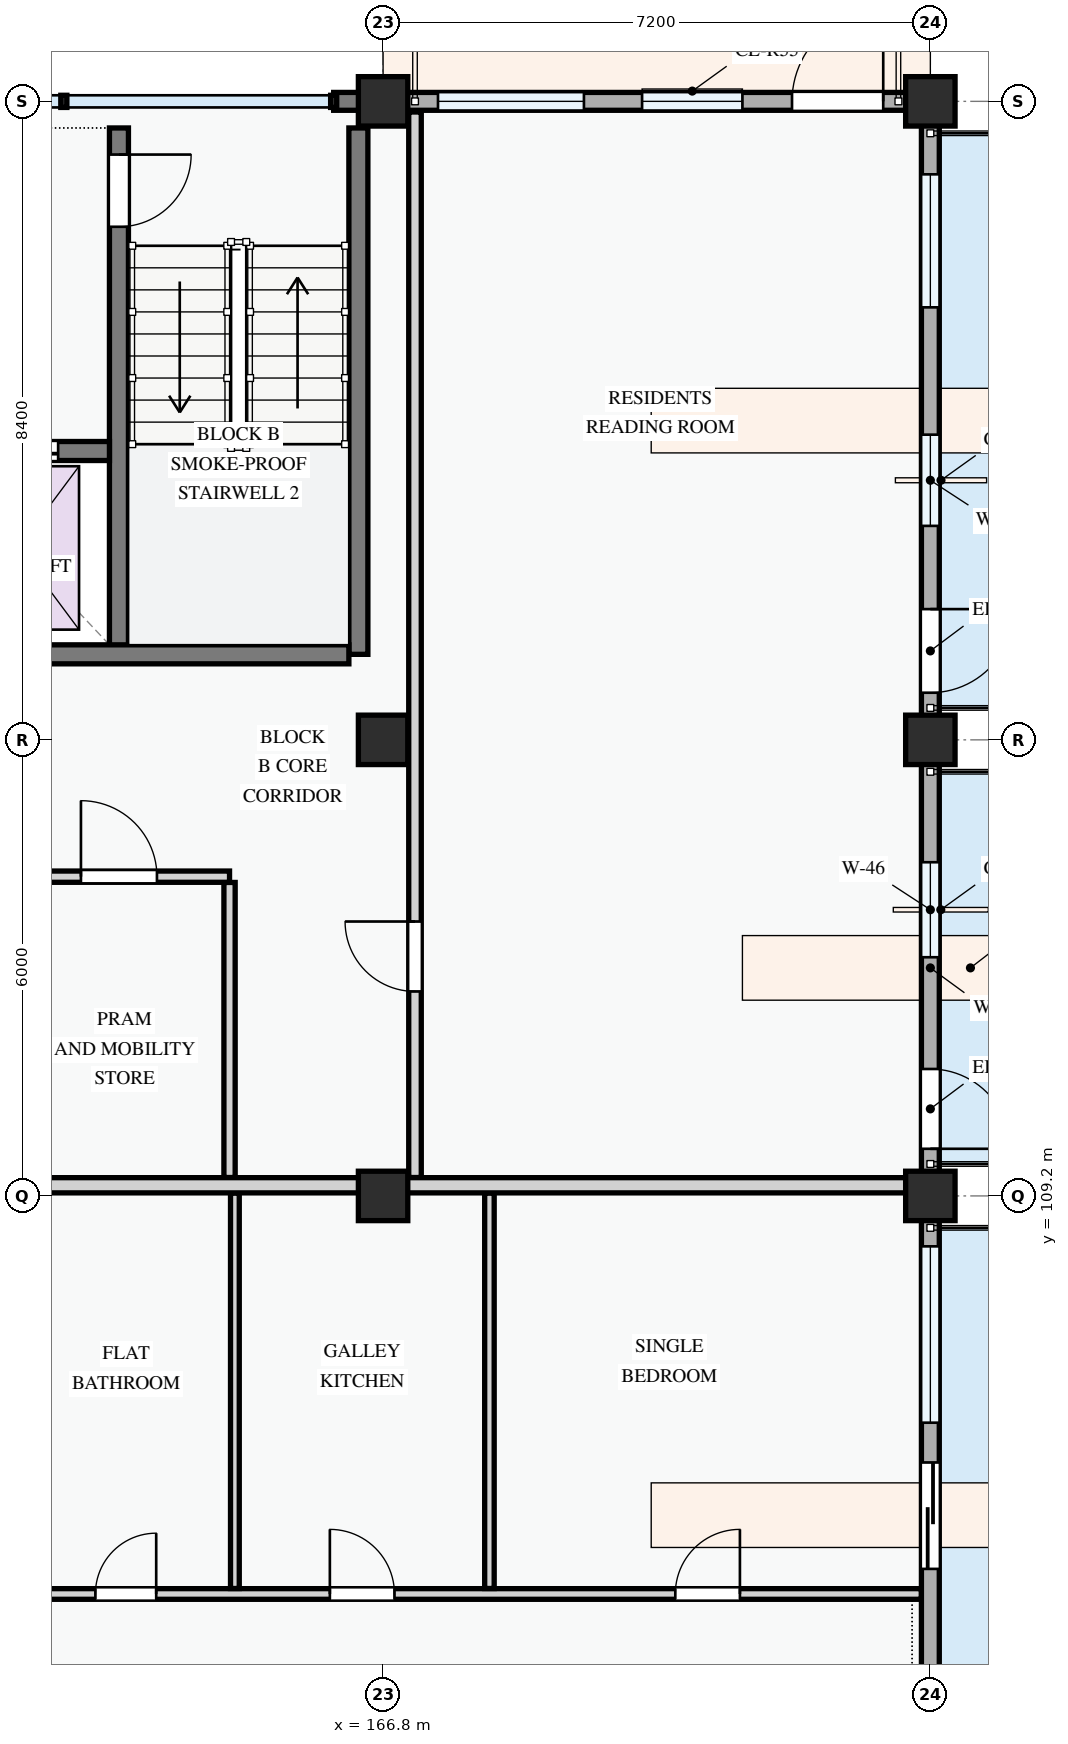
"""IFC4 building model, lengths in metres.
Left out: names, types, materials, properties, quantities, classifications, styles, units other than length and angle.
Written with IfcOpenShell. Run it as: python <this file> out.ifc"""

import sys

from ifc_helpers import new_model, si_unit, direction, frame, frame_2d, origin, origin_2d, place, context, subcontext, project, spatial, rectangle, extrude, element, fill, save


model = new_model("IFC4")
c1 = context("Model", 3, precision=1e-05, world=origin(), true_north=direction((0.0, 1.0)))
c2 = subcontext(c1, "Body", "Model", "MODEL_VIEW")
j1 = project(units=[si_unit("LENGTHUNIT", "METRE"), si_unit("PLANEANGLEUNIT", "RADIAN")], contexts=[c1])
p1 = place(None, origin())
s1 = spatial("IfcSite", under=j1, at=p1, CompositionType="ELEMENT")
p2 = place(p1, origin())
s2 = spatial("IfcBuilding", under=s1, at=p2, CompositionType="ELEMENT")
p3 = place(p2, frame((0.0, 0.0, 8.1)))
s3 = spatial("IfcBuildingStorey", under=s2, at=p3, CompositionType="ELEMENT", Elevation=8.1)
for number, where, z_axis, x_axis in (
    (1, (166.8, 109.2, 0.0), (0.0, 0.0, 1.0), (1.0, 0.0, 0.0)),
    (2, (166.8, 115.2, 0.0), (0.0, 0.0, 1.0), (1.0, 0.0, 0.0)),
    (3, (166.8, 123.6, 0.0), (0.0, 0.0, 1.0), (1.0, 0.0, 0.0)),
    (4, (174.0, 109.2, 0.0), (0.0, 0.0, 1.0), (1.0, 0.0, 0.0)),
    (5, (174.0, 115.2, 0.0), (0.0, 0.0, 1.0), (1.0, 0.0, 0.0)),
    (6, (174.0, 123.6, 0.0), (0.0, 0.0, 1.0), (1.0, 0.0, 0.0)),
):
    element("IfcColumn", number, at=place(p3, frame(where, z_axis=z_axis, x_axis=x_axis)), inside=s3, PredefinedType="COLUMN", context=c2, shape_type="SweptSolid", body=[
        extrude(rectangle(XDim=0.65, YDim=0.65, at=origin_2d()), origin(), (0.0, 0.0, 1.0), 3.3),
    ])
p4 = place(p3, frame((174.0, 109.2, 0.0), z_axis=(0.0, 0.0, 1.0), x_axis=(0.0, 1.0, 0.0)))
e7 = element("IfcWall", 7, at=p4, inside=s3, PredefinedType="STANDARD", context=c2, shape_type="SweptSolid", body=[
    extrude(rectangle(XDim=6.0, YDim=0.235, at=frame_2d((3.0, 0.0))), origin(), (0.0, 0.0, 1.0), 2.575),
])
p5 = place(p4, frame((0.62, 0.0, 0.0)))
e8 = element("IfcOpeningElement", 8, at=p5, cuts=e7, PredefinedType="OPENING", context=c2, shape_type="SweptSolid", body=[
    extrude(rectangle(XDim=1.05, YDim=2.15, at=frame_2d((0.525, 1.075))), frame((0.0, 0.127, 0.0), z_axis=(0.0, -1.0, 0.0), x_axis=(1.0, 0.0, 0.0)), (0.0, 0.0, 1.0), 0.255),
])
p6 = place(p4, frame((3.14, 0.0, 0.78)))
e9 = element("IfcOpeningElement", 9, at=p6, cuts=e7, PredefinedType="OPENING", context=c2, shape_type="SweptSolid", body=[
    extrude(rectangle(XDim=1.25, YDim=1.3, at=frame_2d((0.625, 0.65))), frame((0.0, 0.127, 0.0), z_axis=(0.0, -1.0, 0.0), x_axis=(1.0, 0.0, 0.0)), (0.0, 0.0, 1.0), 0.255),
])
p7 = place(p3, frame((174.0, 115.2, 0.0), z_axis=(0.0, 0.0, 1.0), x_axis=(0.0, 1.0, 0.0)))
e10 = element("IfcWall", 10, at=p7, inside=s3, PredefinedType="STANDARD", context=c2, shape_type="SweptSolid", body=[
    extrude(rectangle(XDim=8.4, YDim=0.235, at=frame_2d((4.2, 0.0))), origin(), (0.0, 0.0, 1.0), 2.425),
])
p8 = place(p7, frame((0.62, 0.0, 0.0)))
e11 = element("IfcOpeningElement", 11, at=p8, cuts=e10, PredefinedType="OPENING", context=c2, shape_type="SweptSolid", body=[
    extrude(rectangle(XDim=1.1, YDim=2.15, at=frame_2d((0.55, 1.075))), frame((0.0, 0.127, 0.0), z_axis=(0.0, -1.0, 0.0), x_axis=(1.0, 0.0, 0.0)), (0.0, 0.0, 1.0), 0.255),
])
p9 = place(p7, frame((2.815, 0.0, 0.78)))
e12 = element("IfcOpeningElement", 12, at=p9, cuts=e10, PredefinedType="OPENING", context=c2, shape_type="SweptSolid", body=[
    extrude(rectangle(XDim=1.2, YDim=1.35, at=frame_2d((0.6, 0.675))), frame((0.0, 0.127, 0.0), z_axis=(0.0, -1.0, 0.0), x_axis=(1.0, 0.0, 0.0)), (0.0, 0.0, 1.0), 0.255),
])
p10 = place(p7, frame((5.69, 0.0, 0.78)))
e13 = element("IfcOpeningElement", 13, at=p10, cuts=e10, PredefinedType="OPENING", context=c2, shape_type="SweptSolid", body=[
    extrude(rectangle(XDim=1.75, YDim=1.45, at=frame_2d((0.875, 0.725))), frame((0.0, 0.127, 0.0), z_axis=(0.0, -1.0, 0.0), x_axis=(1.0, 0.0, 0.0)), (0.0, 0.0, 1.0), 0.255),
])
p11 = place(p3, frame((174.0, 123.6, 0.0), z_axis=(0.0, 0.0, 1.0), x_axis=(-1.0, 0.0, 0.0)))
e14 = element("IfcWall", 14, at=p11, inside=s3, PredefinedType="STANDARD", context=c2, shape_type="SweptSolid", body=[
    extrude(rectangle(XDim=7.2, YDim=0.235, at=frame_2d((3.6, 0.0))), origin(), (0.0, 0.0, 1.0), 2.345),
])
p12 = place(p11, frame((0.62, 0.0, 0.0)))
e15 = element("IfcOpeningElement", 15, at=p12, cuts=e14, PredefinedType="OPENING", context=c2, shape_type="SweptSolid", body=[
    extrude(rectangle(XDim=1.2, YDim=2.15, at=frame_2d((0.6, 1.075))), frame((0.0, 0.127, 0.0), z_axis=(0.0, -1.0, 0.0), x_axis=(1.0, 0.0, 0.0)), (0.0, 0.0, 1.0), 0.255),
])
p13 = place(p11, frame((2.472, 0.0, 0.78)))
e16 = element("IfcOpeningElement", 16, at=p13, cuts=e14, PredefinedType="OPENING", context=c2, shape_type="SweptSolid", body=[
    extrude(rectangle(XDim=1.32, YDim=1.35, at=frame_2d((0.66, 0.675))), frame((0.0, 0.127, 0.0), z_axis=(0.0, -1.0, 0.0), x_axis=(1.0, 0.0, 0.0)), (0.0, 0.0, 1.0), 0.255),
])
p14 = place(p11, frame((4.558, 0.0, 0.78)))
e17 = element("IfcOpeningElement", 17, at=p14, cuts=e14, PredefinedType="OPENING", context=c2, shape_type="SweptSolid", body=[
    extrude(rectangle(XDim=1.92, YDim=1.44, at=frame_2d((0.96, 0.72))), frame((0.0, 0.127, 0.0), z_axis=(0.0, -1.0, 0.0), x_axis=(1.0, 0.0, 0.0)), (0.0, 0.0, 1.0), 0.255),
])
p15 = place(p3, frame((166.8, 123.6, 0.0), z_axis=(0.0, 0.0, 1.0), x_axis=(-1.0, 0.0, 0.0)))
e18 = element("IfcWall", 18, at=p15, inside=s3, PredefinedType="STANDARD", context=c2, shape_type="SweptSolid", body=[
    extrude(rectangle(XDim=0.65, YDim=0.235, at=frame_2d((0.325, 0.0))), origin(), (0.0, 0.0, 1.0), 3.04),
])
p16 = place(p3, frame((174.0, 100.8, 0.0), z_axis=(0.0, 0.0, 1.0), x_axis=(0.0, 1.0, 0.0)))
e19 = element("IfcWall", 19, at=p16, inside=s3, PredefinedType="STANDARD", context=c2, shape_type="SweptSolid", body=[
    extrude(rectangle(XDim=8.4, YDim=0.235, at=frame_2d((4.2, 0.0))), origin(), (0.0, 0.0, 1.0), 2.425),
])
p17 = place(p16, frame((3.493, 0.0, 0.0)))
e20 = element("IfcOpeningElement", 20, at=p17, cuts=e19, PredefinedType="OPENING", context=c2, shape_type="SweptSolid", body=[
    extrude(rectangle(XDim=1.4, YDim=2.2, at=frame_2d((0.7, 1.1))), frame((0.0, 0.127, 0.0), z_axis=(0.0, -1.0, 0.0), x_axis=(1.0, 0.0, 0.0)), (0.0, 0.0, 1.0), 0.255),
])
p18 = place(p16, frame((1.177, 0.0, 0.78)))
e21 = element("IfcOpeningElement", 21, at=p18, cuts=e19, PredefinedType="OPENING", context=c2, shape_type="SweptSolid", body=[
    extrude(rectangle(XDim=1.0, YDim=1.25, at=frame_2d((0.5, 0.625))), frame((0.0, 0.127, 0.0), z_axis=(0.0, -1.0, 0.0), x_axis=(1.0, 0.0, 0.0)), (0.0, 0.0, 1.0), 0.255),
])
p19 = place(p16, frame((5.417, 0.0, 0.78)))
e22 = element("IfcOpeningElement", 22, at=p19, cuts=e19, PredefinedType="OPENING", context=c2, shape_type="SweptSolid", body=[
    extrude(rectangle(XDim=2.32, YDim=1.5, at=frame_2d((1.16, 0.75))), frame((0.0, 0.127, 0.0), z_axis=(0.0, -1.0, 0.0), x_axis=(1.0, 0.0, 0.0)), (0.0, 0.0, 1.0), 0.255),
])
p20 = place(p3, frame((166.475, 123.25, 0.0), z_axis=(0.0, 0.0, 1.0), x_axis=(0.0, -1.0, 0.0)))
e23 = element("IfcWall", 23, at=p20, inside=s3, PredefinedType="SHEAR", context=c2, shape_type="SweptSolid", body=[
    extrude(rectangle(XDim=6.925, YDim=0.25, at=frame_2d((3.462, 0.0))), origin(), (0.0, 0.0, 1.0), 3.0),
])
p21 = place(p3, frame((163.325, 123.25, 0.0), z_axis=(0.0, 0.0, 1.0), x_axis=(0.0, -1.0, 0.0)))
e24 = element("IfcWall", 24, at=p21, inside=s3, PredefinedType="SHEAR", context=c2, shape_type="SweptSolid", body=[
    extrude(rectangle(XDim=6.925, YDim=0.25, at=frame_2d((3.462, 0.0))), origin(), (0.0, 0.0, 1.0), 3.0),
])
p22 = place(p21, frame((0.35, 0.0, 0.0)))
e25 = element("IfcOpeningElement", 25, at=p22, cuts=e24, PredefinedType="OPENING", context=c2, shape_type="SweptSolid", body=[
    extrude(rectangle(XDim=0.95, YDim=2.1, at=frame_2d((0.475, 1.05))), frame((0.0, 0.135, 0.0), z_axis=(0.0, -1.0, 0.0), x_axis=(1.0, 0.0, 0.0)), (0.0, 0.0, 1.0), 0.27),
])
p23 = place(p3, frame((160.775, 119.0, 0.0), z_axis=(0.0, 0.0, 1.0), x_axis=(1.0, 0.0, 0.0)))
e26 = element("IfcWall", 26, at=p23, inside=s3, PredefinedType="SHEAR", context=c2, shape_type="SweptSolid", body=[
    extrude(rectangle(XDim=2.425, YDim=0.25, at=frame_2d((1.212, 0.0))), origin(), (0.0, 0.0, 1.0), 3.0),
])
p24 = place(p23, frame((0.65, 0.0, 0.0)))
e27 = element("IfcOpeningElement", 27, at=p24, cuts=e26, PredefinedType="OPENING", context=c2, shape_type="SweptSolid", body=[
    extrude(rectangle(XDim=1.1, YDim=2.15, at=frame_2d((0.55, 1.075))), frame((0.0, 0.135, 0.0), z_axis=(0.0, -1.0, 0.0), x_axis=(1.0, 0.0, 0.0)), (0.0, 0.0, 1.0), 0.27),
])
p25 = place(p3, frame((152.85, 116.325, 0.0), z_axis=(0.0, 0.0, 1.0), x_axis=(1.0, 0.0, 0.0)))
e28 = element("IfcWall", 28, at=p25, inside=s3, PredefinedType="SHEAR", context=c2, shape_type="SweptSolid", body=[
    extrude(rectangle(XDim=13.5, YDim=0.25, at=frame_2d((6.75, 0.0))), origin(), (0.0, 0.0, 1.0), 3.0),
])
p26 = place(p25, frame((6.2, 0.0, 0.0)))
e29 = element("IfcOpeningElement", 29, at=p26, cuts=e28, PredefinedType="OPENING", context=c2, shape_type="SweptSolid", body=[
    extrude(rectangle(XDim=1.1, YDim=2.15, at=frame_2d((0.55, 1.075))), frame((0.0, 0.135, 0.0), z_axis=(0.0, -1.0, 0.0), x_axis=(1.0, 0.0, 0.0)), (0.0, 0.0, 1.0), 0.27),
])
p27 = place(p3, frame((164.78, 113.324, 0.0), z_axis=(0.0, 0.0, 1.0), x_axis=(0.0, -1.0, 0.0)))
e30 = element("IfcWall", 30, at=p27, inside=s3, PredefinedType="PARTITIONING", context=c2, shape_type="SweptSolid", body=[
    extrude(rectangle(XDim=3.882, YDim=0.148, at=frame_2d((1.941, 0.0))), origin(), (0.0, 0.0, 1.0), 3.0),
])
p28 = place(p3, frame((162.025, 113.4, 0.0), z_axis=(0.0, 0.0, 1.0), x_axis=(1.0, 0.0, 0.0)))
e31 = element("IfcWall", 31, at=p28, inside=s3, PredefinedType="PARTITIONING", context=c2, shape_type="SweptSolid", body=[
    extrude(rectangle(XDim=2.755, YDim=0.148, at=frame_2d((1.377, 0.0))), origin(), (0.0, 0.0, 1.0), 3.0),
])
p29 = place(p28, frame((0.8, 0.0, 0.0)))
e32 = element("IfcOpeningElement", 32, at=p29, cuts=e31, PredefinedType="OPENING", context=c2, shape_type="SweptSolid", body=[
    extrude(rectangle(XDim=1.0, YDim=2.15, at=frame_2d((0.5, 1.075))), frame((0.0, 0.084, 0.0), z_axis=(0.0, -1.0, 0.0), x_axis=(1.0, 0.0, 0.0)), (0.0, 0.0, 1.0), 0.168),
])
p30 = place(p3, frame((167.22, 109.442, 0.0), z_axis=(0.0, 0.0, 1.0), x_axis=(0.0, 1.0, 0.0)))
e33 = element("IfcWall", 33, at=p30, inside=s3, PredefinedType="PARTITIONING", context=c2, shape_type="SweptSolid", body=[
    extrude(rectangle(XDim=14.018, YDim=0.165, at=frame_2d((7.009, 0.0))), origin(), (0.0, 0.0, 1.0), 2.425),
])
p31 = place(p30, frame((2.448, 0.0, 0.0)))
e34 = element("IfcOpeningElement", 34, at=p31, cuts=e33, PredefinedType="OPENING", context=c2, shape_type="SweptSolid", body=[
    extrude(rectangle(XDim=0.92, YDim=2.1, at=frame_2d((0.46, 1.05))), frame((0.0, 0.093, 0.0), z_axis=(0.0, -1.0, 0.0), x_axis=(1.0, 0.0, 0.0)), (0.0, 0.0, 1.0), 0.185),
])
p32 = place(p3, frame((162.064, 103.963, 0.0), z_axis=(0.0, 0.0, 1.0), x_axis=(1.0, 0.0, 0.0)))
e35 = element("IfcWall", 35, at=p32, inside=s3, PredefinedType="PARTITIONING", context=c2, shape_type="SweptSolid", body=[
    extrude(rectangle(XDim=11.816, YDim=0.14, at=frame_2d((5.908, 0.0))), origin(), (0.0, 0.0, 1.0), 3.0),
])
p33 = place(p32, frame((0.951, 0.0, 0.0)))
e36 = element("IfcOpeningElement", 36, at=p33, cuts=e35, PredefinedType="OPENING", context=c2, shape_type="SweptSolid", body=[
    extrude(rectangle(XDim=0.8, YDim=2.1, at=frame_2d((0.4, 1.05))), frame((0.0, 0.08, 0.0), z_axis=(0.0, -1.0, 0.0), x_axis=(1.0, 0.0, 0.0)), (0.0, 0.0, 1.0), 0.16),
])
p34 = place(p32, frame((4.035, 0.0, 0.0)))
e37 = element("IfcOpeningElement", 37, at=p34, cuts=e35, PredefinedType="OPENING", context=c2, shape_type="SweptSolid", body=[
    extrude(rectangle(XDim=0.85, YDim=2.1, at=frame_2d((0.425, 1.05))), frame((0.0, 0.08, 0.0), z_axis=(0.0, -1.0, 0.0), x_axis=(1.0, 0.0, 0.0)), (0.0, 0.0, 1.0), 0.16),
])
p35 = place(p32, frame((8.58, 0.0, 0.0)))
e38 = element("IfcOpeningElement", 38, at=p35, cuts=e35, PredefinedType="OPENING", context=c2, shape_type="SweptSolid", body=[
    extrude(rectangle(XDim=0.85, YDim=2.1, at=frame_2d((0.425, 1.05))), frame((0.0, 0.08, 0.0), z_axis=(0.0, -1.0, 0.0), x_axis=(1.0, 0.0, 0.0)), (0.0, 0.0, 1.0), 0.16),
])
p36 = place(p3, frame((168.199, 104.035, 0.0), z_axis=(0.0, 0.0, 1.0), x_axis=(0.0, 1.0, 0.0)))
e39 = element("IfcWall", 39, at=p36, inside=s3, PredefinedType="PARTITIONING", context=c2, shape_type="SweptSolid", body=[
    extrude(rectangle(XDim=5.203, YDim=0.125, at=frame_2d((2.602, 0.0))), origin(), (0.0, 0.0, 1.0), 3.0),
])
p37 = place(p3, frame((164.85, 104.035, 0.0), z_axis=(0.0, 0.0, 1.0), x_axis=(0.0, 1.0, 0.0)))
e40 = element("IfcWall", 40, at=p37, inside=s3, PredefinedType="PARTITIONING", context=c2, shape_type="SweptSolid", body=[
    extrude(rectangle(XDim=5.203, YDim=0.115, at=frame_2d((2.602, 0.0))), origin(), (0.0, 0.0, 1.0), 3.0),
])
p38 = place(p3, frame((162.064, 109.34, 0.0), z_axis=(0.0, 0.0, 1.0), x_axis=(1.0, 0.0, 0.0)))
e41 = element("IfcWall", 41, at=p38, inside=s3, PredefinedType="PARTITIONING", context=c2, shape_type="SweptSolid", body=[
    extrude(rectangle(XDim=11.816, YDim=0.2, at=frame_2d((5.908, 0.0))), origin(), (0.0, 0.0, 1.0), 2.375),
])
p39 = place(p5, frame((1.05, 0.0, 0.0), z_axis=(0.0, 0.0, 1.0), x_axis=(-1.0, 0.0, 0.0)))
e42 = element("IfcDoor", 42, at=p39, inside=s3, OperationType="SINGLE_SWING_RIGHT", PredefinedType="DOOR", context=c2, shape_type="SweptSolid", body=[
    extrude(rectangle(XDim=1.05, YDim=2.15, at=frame_2d((0.525, 1.075))), frame((0.0, 0.025, 0.0), z_axis=(0.0, -1.0, 0.0), x_axis=(1.0, 0.0, 0.0)), (0.0, 0.0, 1.0), 0.05),
])
fill(e8, e42)
p40 = place(p6, origin())
e43 = element("IfcWindow", 43, at=p40, inside=s3, PartitioningType="SINGLE_PANEL", PredefinedType="WINDOW", context=c2, shape_type="SweptSolid", body=[
    extrude(rectangle(XDim=1.25, YDim=1.3, at=frame_2d((0.625, 0.65))), frame((0.0, 0.03, 0.0), z_axis=(0.0, -1.0, 0.0), x_axis=(1.0, 0.0, 0.0)), (0.0, 0.0, 1.0), 0.06),
])
fill(e9, e43)
p41 = place(p8, frame((1.1, 0.0, 0.0), z_axis=(0.0, 0.0, 1.0), x_axis=(-1.0, 0.0, 0.0)))
e44 = element("IfcDoor", 44, at=p41, inside=s3, OperationType="SINGLE_SWING_LEFT", PredefinedType="DOOR", context=c2, shape_type="SweptSolid", body=[
    extrude(rectangle(XDim=1.1, YDim=2.15, at=frame_2d((0.55, 1.075))), frame((0.0, 0.025, 0.0), z_axis=(0.0, -1.0, 0.0), x_axis=(1.0, 0.0, 0.0)), (0.0, 0.0, 1.0), 0.05),
])
fill(e11, e44)
p42 = place(p9, origin())
e45 = element("IfcWindow", 45, at=p42, inside=s3, PartitioningType="SINGLE_PANEL", PredefinedType="WINDOW", context=c2, shape_type="SweptSolid", body=[
    extrude(rectangle(XDim=1.2, YDim=1.35, at=frame_2d((0.6, 0.675))), frame((0.0, 0.03, 0.0), z_axis=(0.0, -1.0, 0.0), x_axis=(1.0, 0.0, 0.0)), (0.0, 0.0, 1.0), 0.06),
])
fill(e12, e45)
p43 = place(p10, origin())
e46 = element("IfcWindow", 46, at=p43, inside=s3, PartitioningType="DOUBLE_PANEL_VERTICAL", PredefinedType="WINDOW", context=c2, shape_type="SweptSolid", body=[
    extrude(rectangle(XDim=1.75, YDim=1.45, at=frame_2d((0.875, 0.725))), frame((0.0, 0.03, 0.0), z_axis=(0.0, -1.0, 0.0), x_axis=(1.0, 0.0, 0.0)), (0.0, 0.0, 1.0), 0.06),
])
fill(e13, e46)
p44 = place(p12, frame((1.2, 0.0, 0.0), z_axis=(0.0, 0.0, 1.0), x_axis=(-1.0, 0.0, 0.0)))
e47 = element("IfcDoor", 47, at=p44, inside=s3, OperationType="SINGLE_SWING_RIGHT", PredefinedType="DOOR", context=c2, shape_type="SweptSolid", body=[
    extrude(rectangle(XDim=1.2, YDim=2.15, at=frame_2d((0.6, 1.075))), frame((0.0, 0.025, 0.0), z_axis=(0.0, -1.0, 0.0), x_axis=(1.0, 0.0, 0.0)), (0.0, 0.0, 1.0), 0.05),
])
fill(e15, e47)
p45 = place(p13, origin())
e48 = element("IfcWindow", 48, at=p45, inside=s3, PartitioningType="SINGLE_PANEL", PredefinedType="WINDOW", context=c2, shape_type="SweptSolid", body=[
    extrude(rectangle(XDim=1.32, YDim=1.35, at=frame_2d((0.66, 0.675))), frame((0.0, 0.03, 0.0), z_axis=(0.0, -1.0, 0.0), x_axis=(1.0, 0.0, 0.0)), (0.0, 0.0, 1.0), 0.06),
])
fill(e16, e48)
p46 = place(p14, origin())
e49 = element("IfcWindow", 49, at=p46, inside=s3, PartitioningType="DOUBLE_PANEL_VERTICAL", PredefinedType="WINDOW", context=c2, shape_type="SweptSolid", body=[
    extrude(rectangle(XDim=1.92, YDim=1.44, at=frame_2d((0.96, 0.72))), frame((0.0, 0.03, 0.0), z_axis=(0.0, -1.0, 0.0), x_axis=(1.0, 0.0, 0.0)), (0.0, 0.0, 1.0), 0.06),
])
fill(e17, e49)
p47 = place(p17, frame((1.4, 0.0, 0.0), z_axis=(0.0, 0.0, 1.0), x_axis=(-1.0, 0.0, 0.0)))
e50 = element("IfcDoor", 50, at=p47, inside=s3, OperationType="SLIDING_TO_LEFT", PredefinedType="DOOR", context=c2, shape_type="SweptSolid", body=[
    extrude(rectangle(XDim=1.4, YDim=2.2, at=frame_2d((0.7, 1.1))), frame((0.0, 0.025, 0.0), z_axis=(0.0, -1.0, 0.0), x_axis=(1.0, 0.0, 0.0)), (0.0, 0.0, 1.0), 0.05),
])
fill(e20, e50)
p48 = place(p19, origin())
e51 = element("IfcWindow", 51, at=p48, inside=s3, PartitioningType="DOUBLE_PANEL_VERTICAL", PredefinedType="WINDOW", context=c2, shape_type="SweptSolid", body=[
    extrude(rectangle(XDim=2.32, YDim=1.5, at=frame_2d((1.16, 0.75))), frame((0.0, 0.03, 0.0), z_axis=(0.0, -1.0, 0.0), x_axis=(1.0, 0.0, 0.0)), (0.0, 0.0, 1.0), 0.06),
])
fill(e22, e51)
p49 = place(p22, origin())
e52 = element("IfcDoor", 52, at=p49, inside=s3, OperationType="SINGLE_SWING_LEFT", PredefinedType="DOOR", context=c2, shape_type="SweptSolid", body=[
    extrude(rectangle(XDim=0.95, YDim=2.1, at=frame_2d((0.475, 1.05))), frame((0.0, 0.025, 0.0), z_axis=(0.0, -1.0, 0.0), x_axis=(1.0, 0.0, 0.0)), (0.0, 0.0, 1.0), 0.05),
])
fill(e25, e52)
p50 = place(p24, origin())
e53 = element("IfcDoor", 53, at=p50, inside=s3, OperationType="SLIDING_TO_LEFT", PredefinedType="DOOR", context=c2, shape_type="SweptSolid", body=[
    extrude(rectangle(XDim=1.1, YDim=2.15, at=frame_2d((0.55, 1.075))), frame((0.0, 0.025, 0.0), z_axis=(0.0, -1.0, 0.0), x_axis=(1.0, 0.0, 0.0)), (0.0, 0.0, 1.0), 0.05),
])
fill(e27, e53)
p51 = place(p29, origin())
e54 = element("IfcDoor", 54, at=p51, inside=s3, OperationType="SINGLE_SWING_LEFT", PredefinedType="DOOR", context=c2, shape_type="SweptSolid", body=[
    extrude(rectangle(XDim=1.0, YDim=2.15, at=frame_2d((0.5, 1.075))), frame((0.0, 0.025, 0.0), z_axis=(0.0, -1.0, 0.0), x_axis=(1.0, 0.0, 0.0)), (0.0, 0.0, 1.0), 0.05),
])
fill(e32, e54)
p52 = place(p31, origin())
e55 = element("IfcDoor", 55, at=p52, inside=s3, OperationType="SINGLE_SWING_RIGHT", PredefinedType="DOOR", context=c2, shape_type="SweptSolid", body=[
    extrude(rectangle(XDim=0.92, YDim=2.1, at=frame_2d((0.46, 1.05))), frame((0.0, 0.025, 0.0), z_axis=(0.0, -1.0, 0.0), x_axis=(1.0, 0.0, 0.0)), (0.0, 0.0, 1.0), 0.05),
])
fill(e34, e55)
p53 = place(p33, origin())
e56 = element("IfcDoor", 56, at=p53, inside=s3, OperationType="SINGLE_SWING_RIGHT", PredefinedType="DOOR", context=c2, shape_type="SweptSolid", body=[
    extrude(rectangle(XDim=0.8, YDim=2.1, at=frame_2d((0.4, 1.05))), frame((0.0, 0.025, 0.0), z_axis=(0.0, -1.0, 0.0), x_axis=(1.0, 0.0, 0.0)), (0.0, 0.0, 1.0), 0.05),
])
fill(e36, e56)
p54 = place(p34, origin())
e57 = element("IfcDoor", 57, at=p54, inside=s3, OperationType="SINGLE_SWING_LEFT", PredefinedType="DOOR", context=c2, shape_type="SweptSolid", body=[
    extrude(rectangle(XDim=0.85, YDim=2.1, at=frame_2d((0.425, 1.05))), frame((0.0, 0.025, 0.0), z_axis=(0.0, -1.0, 0.0), x_axis=(1.0, 0.0, 0.0)), (0.0, 0.0, 1.0), 0.05),
])
fill(e37, e57)
p55 = place(p35, origin())
e58 = element("IfcDoor", 58, at=p55, inside=s3, OperationType="SINGLE_SWING_RIGHT", PredefinedType="DOOR", context=c2, shape_type="SweptSolid", body=[
    extrude(rectangle(XDim=0.85, YDim=2.1, at=frame_2d((0.425, 1.05))), frame((0.0, 0.025, 0.0), z_axis=(0.0, -1.0, 0.0), x_axis=(1.0, 0.0, 0.0)), (0.0, 0.0, 1.0), 0.05),
])
fill(e38, e58)
save(model, sys.argv[1])
